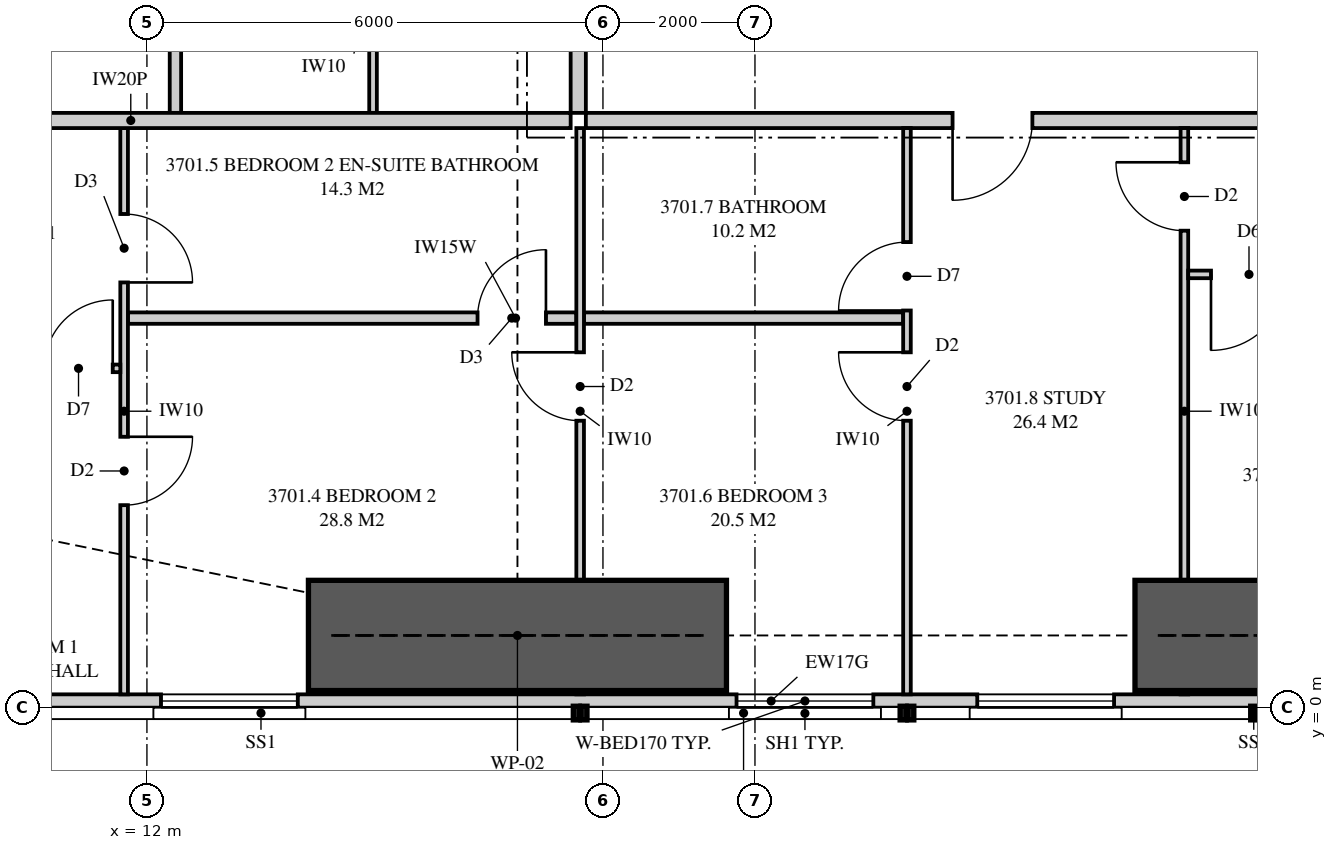
"""IFC4 building model, lengths in metres.
Left out: names, types, materials, properties, quantities, classifications, styles, units other than length and angle.
Written with IfcOpenShell. Run it as: python <this file> out.ifc"""

import sys

from ifc_helpers import new_model, si_unit, direction, frame, frame_2d, origin, place, context, subcontext, project, spatial, polyline, rectangle, outline, extrude, element, fill, save


model = new_model("IFC4")
c1 = context("Model", 3, precision=1e-05, world=origin(), true_north=direction((0.0, 1.0)))
c2 = subcontext(c1, "Body", "Model", "MODEL_VIEW")
j1 = project(units=[si_unit("LENGTHUNIT", "METRE"), si_unit("PLANEANGLEUNIT", "RADIAN")], contexts=[c1])
p1 = place(None, origin())
s1 = spatial("IfcSite", under=j1, at=p1, CompositionType="ELEMENT")
p2 = place(p1, origin())
s2 = spatial("IfcBuilding", under=s1, at=p2, CompositionType="ELEMENT")
p3 = place(p2, frame((0.0, 0.0, 135.0)))
s3 = spatial("IfcBuildingStorey", under=s2, at=p3, CompositionType="ELEMENT", Elevation=135.0)
p4 = place(p3, frame((9.051, 0.087, 0.0), z_axis=(0.0, 0.0, 1.0), x_axis=(1.0, 0.0, 0.0)))
e1 = element("IfcWall", 1, at=p4, inside=s3, PredefinedType="SOLIDWALL", context=c2, shape_type="SweptSolid", body=[
    extrude(outline(polyline([(0.0, 0.0), (22.324, 0.0), (22.324, 2.15), (7.824, 2.15), (7.824, 3.11), (7.666, 3.11), (7.666, 2.15), (7.62, 2.15), (7.62, 3.11), (0.0, 3.11), (0.0, 0.0)])), frame((0.0, 0.087, 0.0), z_axis=(0.0, -1.0, 0.0), x_axis=(1.0, 0.0, 0.0)), (0.0, 0.0, 1.0), 0.175),
])
p5 = place(p4, frame((3.134, 0.0, 0.4)))
e2 = element("IfcOpeningElement", 2, at=p5, cuts=e1, PredefinedType="OPENING", context=c2, shape_type="SweptSolid", body=[
    extrude(rectangle(XDim=1.8, YDim=1.7, at=frame_2d((0.9, 0.85))), frame((0.0, 0.097, 0.0), z_axis=(0.0, -1.0, 0.0), x_axis=(1.0, 0.0, 0.0)), (0.0, 0.0, 1.0), 0.195),
])
p6 = place(p4, frame((10.706, 0.0, 0.4)))
e3 = element("IfcOpeningElement", 3, at=p6, cuts=e1, PredefinedType="OPENING", context=c2, shape_type="SweptSolid", body=[
    extrude(rectangle(XDim=1.8, YDim=1.7, at=frame_2d((0.9, 0.85))), frame((0.0, 0.097, 0.0), z_axis=(0.0, -1.0, 0.0), x_axis=(1.0, 0.0, 0.0)), (0.0, 0.0, 1.0), 0.195),
])
p7 = place(p4, frame((13.874, 0.0, 0.4)))
e4 = element("IfcOpeningElement", 4, at=p7, cuts=e1, PredefinedType="OPENING", context=c2, shape_type="SweptSolid", body=[
    extrude(rectangle(XDim=1.8, YDim=1.7, at=frame_2d((0.9, 0.85))), frame((0.0, 0.097, 0.0), z_axis=(0.0, -1.0, 0.0), x_axis=(1.0, 0.0, 0.0)), (0.0, 0.0, 1.0), 0.195),
])
p8 = place(p3, frame((17.775, 7.725, 0.0), z_axis=(0.0, 0.0, 1.0), x_axis=(1.0, 0.0, 0.0)))
e5 = element("IfcWall", 5, at=p8, inside=s3, PredefinedType="PARTITIONING", context=c2, shape_type="SweptSolid", body=[
    extrude(outline(polyline([(0.0, 0.0), (22.325, 0.0), (22.325, 3.11), (21.187, 3.11), (21.187, 2.541), (20.513, 2.541), (20.513, 3.11), (10.312, 3.11), (10.312, 2.541), (9.638, 2.541), (9.638, 3.11), (0.0, 3.11), (0.0, 0.0)])), frame((0.0, 0.1, 0.0), z_axis=(0.0, -1.0, 0.0), x_axis=(1.0, 0.0, 0.0)), (0.0, 0.0, 1.0), 0.2),
])
p9 = place(p8, frame((4.825, 0.0, 0.0)))
e6 = element("IfcOpeningElement", 6, at=p9, cuts=e5, PredefinedType="OPENING", context=c2, shape_type="SweptSolid", body=[
    extrude(rectangle(XDim=1.05, YDim=2.2, at=frame_2d((0.525, 1.1))), frame((0.0, 0.11, 0.0), z_axis=(0.0, -1.0, 0.0), x_axis=(1.0, 0.0, 0.0)), (0.0, 0.0, 1.0), 0.22),
])
p10 = place(p3, frame((11.7, 0.175, 0.0), z_axis=(0.0, 0.0, 1.0), x_axis=(0.0, 1.0, 0.0)))
e7 = element("IfcWall", 7, at=p10, inside=s3, PredefinedType="PARTITIONING", context=c2, shape_type="SweptSolid", body=[
    extrude(outline(polyline([(0.0, 0.0), (7.45, 0.0), (7.45, 3.11), (2.708, 3.11), (2.708, 2.15), (0.953, 2.15), (0.953, 3.11), (0.0, 3.11), (0.0, 0.0)])), frame((0.0, 0.05, 0.0), z_axis=(0.0, -1.0, 0.0), x_axis=(1.0, 0.0, 0.0)), (0.0, 0.0, 1.0), 0.1),
])
p11 = place(p10, frame((2.489, 0.0, 0.0)))
e8 = element("IfcOpeningElement", 8, at=p11, cuts=e7, PredefinedType="OPENING", context=c2, shape_type="SweptSolid", body=[
    extrude(rectangle(XDim=0.9, YDim=2.1, at=frame_2d((0.45, 1.05))), frame((0.0, 0.06, 0.0), z_axis=(0.0, -1.0, 0.0), x_axis=(1.0, 0.0, 0.0)), (0.0, 0.0, 1.0), 0.12),
])
p12 = place(p10, frame((5.419, 0.0, 0.0)))
e9 = element("IfcOpeningElement", 9, at=p12, cuts=e7, PredefinedType="OPENING", context=c2, shape_type="SweptSolid", body=[
    extrude(rectangle(XDim=0.9, YDim=2.1, at=frame_2d((0.45, 1.05))), frame((0.0, 0.06, 0.0), z_axis=(0.0, -1.0, 0.0), x_axis=(1.0, 0.0, 0.0)), (0.0, 0.0, 1.0), 0.12),
])
p13 = place(p3, frame((17.7, 0.175, 0.0), z_axis=(0.0, 0.0, 1.0), x_axis=(0.0, 1.0, 0.0)))
e10 = element("IfcWall", 10, at=p13, inside=s3, PredefinedType="PARTITIONING", context=c2, shape_type="SweptSolid", body=[
    extrude(outline(polyline([(1.635, 2.15), (0.0, 2.15), (0.0, 0.0), (7.45, 0.0), (7.45, 3.11), (1.635, 3.11), (1.635, 2.15)]), holes=[polyline([(1.021, 0.116), (0.529, 0.116), (0.529, 0.906), (1.021, 0.906), (1.021, 0.116)]), polyline([(1.021, 1.244), (0.529, 1.244), (0.529, 2.034), (1.021, 2.034), (1.021, 1.244)])]), frame((0.0, 0.05, 0.0), z_axis=(0.0, -1.0, 0.0), x_axis=(1.0, 0.0, 0.0)), (0.0, 0.0, 1.0), 0.1),
])
p14 = place(p13, frame((3.6, 0.0, 0.0)))
e11 = element("IfcOpeningElement", 11, at=p14, cuts=e10, PredefinedType="OPENING", context=c2, shape_type="SweptSolid", body=[
    extrude(rectangle(XDim=0.9, YDim=2.1, at=frame_2d((0.45, 1.05))), frame((0.0, 0.06, 0.0), z_axis=(0.0, -1.0, 0.0), x_axis=(1.0, 0.0, 0.0)), (0.0, 0.0, 1.0), 0.12),
])
p15 = place(p3, frame((22.0, 0.175, 0.0), z_axis=(0.0, 0.0, 1.0), x_axis=(0.0, 1.0, 0.0)))
e12 = element("IfcWall", 12, at=p15, inside=s3, PredefinedType="PARTITIONING", context=c2, shape_type="SweptSolid", body=[
    extrude(outline(polyline([(0.0, 0.0), (7.45, 0.0), (7.45, 3.11), (1.635, 3.11), (1.635, 2.15), (0.0, 2.15), (0.0, 3.11), (0.0, 0.0)])), frame((0.0, 0.05, 0.0), z_axis=(0.0, -1.0, 0.0), x_axis=(1.0, 0.0, 0.0)), (0.0, 0.0, 1.0), 0.1),
])
p16 = place(p15, frame((3.6, 0.0, 0.0)))
e13 = element("IfcOpeningElement", 13, at=p16, cuts=e12, PredefinedType="OPENING", context=c2, shape_type="SweptSolid", body=[
    extrude(rectangle(XDim=0.9, YDim=2.1, at=frame_2d((0.45, 1.05))), frame((0.0, 0.06, 0.0), z_axis=(0.0, -1.0, 0.0), x_axis=(1.0, 0.0, 0.0)), (0.0, 0.0, 1.0), 0.12),
])
p17 = place(p15, frame((5.05, 0.0, 0.0)))
e14 = element("IfcOpeningElement", 14, at=p17, cuts=e12, PredefinedType="OPENING", context=c2, shape_type="SweptSolid", body=[
    extrude(rectangle(XDim=0.9, YDim=2.1, at=frame_2d((0.45, 1.05))), frame((0.0, 0.06, 0.0), z_axis=(0.0, -1.0, 0.0), x_axis=(1.0, 0.0, 0.0)), (0.0, 0.0, 1.0), 0.12),
])
p18 = place(p3, frame((6.0, 4.464, 0.0), z_axis=(0.0, 0.0, 1.0), x_axis=(1.0, 0.0, 0.0)))
e15 = element("IfcWall", 15, at=p18, inside=s3, PredefinedType="PARTITIONING", context=c2, shape_type="SweptSolid", body=[
    extrude(outline(polyline([(0.0, 0.0), (5.65, 0.0), (5.65, 3.11), (5.46, 3.11), (5.46, 2.51), (3.206, 2.51), (3.206, 2.15), (1.463, 2.15), (1.463, 3.11), (0.0, 3.11), (0.0, 0.0)])), frame((0.0, 0.05, 0.0), z_axis=(0.0, -1.0, 0.0), x_axis=(1.0, 0.0, 0.0)), (0.0, 0.0, 1.0), 0.1),
])
p19 = place(p18, frame((4.65, 0.0, 0.0)))
e16 = element("IfcOpeningElement", 16, at=p19, cuts=e15, PredefinedType="OPENING", context=c2, shape_type="SweptSolid", body=[
    extrude(rectangle(XDim=0.9, YDim=2.1, at=frame_2d((0.45, 1.05))), frame((0.0, 0.06, 0.0), z_axis=(0.0, -1.0, 0.0), x_axis=(1.0, 0.0, 0.0)), (0.0, 0.0, 1.0), 0.12),
])
p20 = place(p3, frame((11.75, 5.125, 0.0), z_axis=(0.0, 0.0, 1.0), x_axis=(1.0, 0.0, 0.0)))
e17 = element("IfcWall", 17, at=p20, inside=s3, PredefinedType="PLUMBINGWALL", context=c2, shape_type="SweptSolid", body=[
    extrude(outline(polyline([(0.0, 0.0), (5.9, 0.0), (5.9, 3.11), (5.438, 3.11), (5.438, 2.541), (4.812, 2.541), (4.812, 3.11), (0.0, 3.11), (0.0, 0.0)])), frame((0.0, 0.075, 0.0), z_axis=(0.0, -1.0, 0.0), x_axis=(1.0, 0.0, 0.0)), (0.0, 0.0, 1.0), 0.15),
])
p21 = place(p20, frame((4.6, 0.0, 0.0)))
e18 = element("IfcOpeningElement", 18, at=p21, cuts=e17, PredefinedType="OPENING", context=c2, shape_type="SweptSolid", body=[
    extrude(rectangle(XDim=0.9, YDim=2.1, at=frame_2d((0.45, 1.05))), frame((0.0, 0.085, 0.0), z_axis=(0.0, -1.0, 0.0), x_axis=(1.0, 0.0, 0.0)), (0.0, 0.0, 1.0), 0.17),
])
p22 = place(p3, frame((17.75, 5.125, 0.0), z_axis=(0.0, 0.0, 1.0), x_axis=(1.0, 0.0, 0.0)))
e19 = element("IfcWall", 19, at=p22, inside=s3, PredefinedType="PLUMBINGWALL", context=c2, shape_type="SweptSolid", body=[
    extrude(rectangle(XDim=4.2, YDim=0.15, at=frame_2d((2.1, 0.0))), origin(), (0.0, 0.0, 1.0), 3.11),
])
p23 = place(p3, frame((25.65, 0.175, 0.0), z_axis=(0.0, 0.0, 1.0), x_axis=(0.0, 1.0, 0.0)))
e20 = element("IfcWall", 20, at=p23, inside=s3, PredefinedType="PARTITIONING", context=c2, shape_type="SweptSolid", body=[
    extrude(outline(polyline([(0.529, 2.15), (0.0, 2.15), (0.0, 0.0), (0.529, 0.0), (0.529, 0.034), (1.021, 0.034), (1.021, 0.0), (7.45, 0.0), (7.45, 3.11), (1.635, 3.11), (1.635, 2.15), (1.021, 2.15), (1.021, 2.116), (0.529, 2.116), (0.529, 2.15)])), frame((0.0, 0.05, 0.0), z_axis=(0.0, -1.0, 0.0), x_axis=(1.0, 0.0, 0.0)), (0.0, 0.0, 1.0), 0.1),
])
p24 = place(p23, frame((6.1, 0.0, 0.0)))
e21 = element("IfcOpeningElement", 21, at=p24, cuts=e20, PredefinedType="OPENING", context=c2, shape_type="SweptSolid", body=[
    extrude(rectangle(XDim=0.9, YDim=2.1, at=frame_2d((0.45, 1.05))), frame((0.0, 0.06, 0.0), z_axis=(0.0, -1.0, 0.0), x_axis=(1.0, 0.0, 0.0)), (0.0, 0.0, 1.0), 0.12),
])
p25 = place(p3, frame((25.7, 5.7, 0.0), z_axis=(0.0, 0.0, 1.0), x_axis=(1.0, 0.0, 0.0)))
e22 = element("IfcWall", 22, at=p25, inside=s3, PredefinedType="PARTITIONING", context=c2, shape_type="SweptSolid", body=[
    extrude(outline(polyline([(0.0, 0.0), (10.75, 0.0), (10.75, 3.11), (2.337, 3.11), (2.337, 2.541), (1.763, 2.541), (1.763, 3.11), (0.0, 3.11), (0.0, 0.0)])), frame((0.0, 0.05, 0.0), z_axis=(0.0, -1.0, 0.0), x_axis=(1.0, 0.0, 0.0)), (0.0, 0.0, 1.0), 0.1),
])
p26 = place(p25, frame((0.3, 0.0, 0.0)))
e23 = element("IfcOpeningElement", 23, at=p26, cuts=e22, PredefinedType="OPENING", context=c2, shape_type="SweptSolid", body=[
    extrude(rectangle(XDim=1.0, YDim=2.1, at=frame_2d((0.5, 1.05))), frame((0.0, 0.06, 0.0), z_axis=(0.0, -1.0, 0.0), x_axis=(1.0, 0.0, 0.0)), (0.0, 0.0, 1.0), 0.12),
])
p27 = place(p3, frame((6.0, 7.725, 0.0), z_axis=(0.0, 0.0, 1.0), x_axis=(1.0, 0.0, 0.0)))
e24 = element("IfcWall", 24, at=p27, inside=s3, PredefinedType="PARTITIONING", context=c2, shape_type="SweptSolid", body=[
    extrude(outline(polyline([(0.0, 0.0), (11.575, 0.0), (11.575, 3.11), (11.212, 3.11), (11.212, 2.541), (10.538, 2.541), (10.538, 3.11), (5.51, 3.11), (5.51, 2.51), (2.969, 2.51), (2.969, 2.541), (2.727, 2.541), (2.727, 2.15), (0.884, 2.15), (0.884, 3.11), (0.0, 3.11), (0.0, 0.0)])), frame((0.0, 0.1, 0.0), z_axis=(0.0, -1.0, 0.0), x_axis=(1.0, 0.0, 0.0)), (0.0, 0.0, 1.0), 0.2),
])
p28 = place(p3, frame((17.675, 7.825, 0.0), z_axis=(0.0, 0.0, 1.0), x_axis=(0.0, 1.0, 0.0)))
e25 = element("IfcWall", 25, at=p28, inside=s3, PredefinedType="PARTITIONING", context=c2, shape_type="SweptSolid", body=[
    extrude(outline(polyline([(0.0, 0.0), (15.425, 0.0), (15.425, 3.11), (3.087, 3.11), (3.087, 2.541), (2.413, 2.541), (2.413, 3.11), (0.0, 3.11), (0.0, 0.0)])), frame((0.0, 0.1, 0.0), z_axis=(0.0, -1.0, 0.0), x_axis=(1.0, 0.0, 0.0)), (0.0, 0.0, 1.0), 0.2),
])
p29 = place(p28, frame((7.212, 0.0, 0.0)))
e26 = element("IfcOpeningElement", 26, at=p29, cuts=e25, PredefinedType="OPENING", context=c2, shape_type="SweptSolid", body=[
    extrude(rectangle(XDim=1.05, YDim=2.2, at=frame_2d((0.525, 1.1))), frame((0.0, 0.11, 0.0), z_axis=(0.0, -1.0, 0.0), x_axis=(1.0, 0.0, 0.0)), (0.0, 0.0, 1.0), 0.22),
])
p30 = place(p3, frame((12.375, 7.825, 0.0), z_axis=(0.0, 0.0, 1.0), x_axis=(0.0, 1.0, 0.0)))
e27 = element("IfcWall", 27, at=p30, inside=s3, PredefinedType="PLUMBINGWALL", context=c2, shape_type="SweptSolid", body=[
    extrude(outline(polyline([(0.0, 0.0), (3.45, 0.0), (3.45, 3.11), (3.062, 3.11), (3.062, 2.541), (2.438, 2.541), (2.438, 3.11), (0.0, 3.11), (0.0, 0.0)])), frame((0.0, 0.075, 0.0), z_axis=(0.0, -1.0, 0.0), x_axis=(1.0, 0.0, 0.0)), (0.0, 0.0, 1.0), 0.15),
])
p31 = place(p3, frame((14.975, 7.825, 0.0), z_axis=(0.0, 0.0, 1.0), x_axis=(0.0, 1.0, 0.0)))
e28 = element("IfcWall", 28, at=p31, inside=s3, PredefinedType="PARTITIONING", context=c2, shape_type="SweptSolid", body=[
    extrude(outline(polyline([(0.0, 0.0), (3.45, 0.0), (3.45, 3.11), (3.037, 3.11), (3.037, 2.541), (2.463, 2.541), (2.463, 3.11), (0.0, 3.11), (0.0, 0.0)])), frame((0.0, 0.05, 0.0), z_axis=(0.0, -1.0, 0.0), x_axis=(1.0, 0.0, 0.0)), (0.0, 0.0, 1.0), 0.1),
])
for number, where, z_axis, x_axis in (
    (29, (14.125, 0.95, 0.0), (0.0, 0.0, 1.0), (1.0, 0.0, 0.0)),
    (30, (25.0, 0.95, 0.0), (0.0, 0.0, 1.0), (1.0, 0.0, 0.0)),
):
    element("IfcWall", number, at=place(p3, frame(where, z_axis=z_axis, x_axis=x_axis)), inside=s3, PredefinedType="SHEAR", context=c2, shape_type="SweptSolid", body=[
        extrude(rectangle(XDim=5.5, YDim=1.45, at=frame_2d((2.75, 0.0))), origin(), (0.0, 0.0, 1.0), 3.35),
    ])
p32 = place(p5, origin())
e31 = element("IfcWindow", 31, at=p32, inside=s3, PartitioningType="SINGLE_PANEL", PredefinedType="WINDOW", context=c2, shape_type="SweptSolid", body=[
    extrude(rectangle(XDim=1.8, YDim=1.7, at=frame_2d((0.9, 0.85))), frame((0.0, 0.03, 0.0), z_axis=(0.0, -1.0, 0.0), x_axis=(1.0, 0.0, 0.0)), (0.0, 0.0, 1.0), 0.06),
])
fill(e2, e31)
p33 = place(p6, origin())
e32 = element("IfcWindow", 32, at=p33, inside=s3, PartitioningType="SINGLE_PANEL", PredefinedType="WINDOW", context=c2, shape_type="SweptSolid", body=[
    extrude(rectangle(XDim=1.8, YDim=1.7, at=frame_2d((0.9, 0.85))), frame((0.0, 0.03, 0.0), z_axis=(0.0, -1.0, 0.0), x_axis=(1.0, 0.0, 0.0)), (0.0, 0.0, 1.0), 0.06),
])
fill(e3, e32)
p34 = place(p7, origin())
e33 = element("IfcWindow", 33, at=p34, inside=s3, PartitioningType="SINGLE_PANEL", PredefinedType="WINDOW", context=c2, shape_type="SweptSolid", body=[
    extrude(rectangle(XDim=1.8, YDim=1.7, at=frame_2d((0.9, 0.85))), frame((0.0, 0.03, 0.0), z_axis=(0.0, -1.0, 0.0), x_axis=(1.0, 0.0, 0.0)), (0.0, 0.0, 1.0), 0.06),
])
fill(e4, e33)
p35 = place(p9, frame((1.05, 0.0, 0.0), z_axis=(0.0, 0.0, 1.0), x_axis=(-1.0, 0.0, 0.0)))
e34 = element("IfcDoor", 34, at=p35, inside=s3, OperationType="SINGLE_SWING_RIGHT", PredefinedType="DOOR", context=c2, shape_type="SweptSolid", body=[
    extrude(rectangle(XDim=1.05, YDim=2.2, at=frame_2d((0.525, 1.1))), frame((0.0, 0.025, 0.0), z_axis=(0.0, -1.0, 0.0), x_axis=(1.0, 0.0, 0.0)), (0.0, 0.0, 1.0), 0.05),
])
fill(e6, e34)
p36 = place(p19, origin())
e35 = element("IfcDoor", 35, at=p36, inside=s3, OperationType="SINGLE_SWING_RIGHT", PredefinedType="DOOR", context=c2, shape_type="SweptSolid", body=[
    extrude(rectangle(XDim=0.9, YDim=2.1, at=frame_2d((0.45, 1.05))), frame((0.0, 0.025, 0.0), z_axis=(0.0, -1.0, 0.0), x_axis=(1.0, 0.0, 0.0)), (0.0, 0.0, 1.0), 0.05),
])
fill(e16, e35)
p37 = place(p11, frame((0.9, 0.0, 0.0), z_axis=(0.0, 0.0, 1.0), x_axis=(-1.0, 0.0, 0.0)))
e36 = element("IfcDoor", 36, at=p37, inside=s3, OperationType="SINGLE_SWING_LEFT", PredefinedType="DOOR", context=c2, shape_type="SweptSolid", body=[
    extrude(rectangle(XDim=0.9, YDim=2.1, at=frame_2d((0.45, 1.05))), frame((0.0, 0.025, 0.0), z_axis=(0.0, -1.0, 0.0), x_axis=(1.0, 0.0, 0.0)), (0.0, 0.0, 1.0), 0.05),
])
fill(e8, e36)
p38 = place(p14, origin())
e37 = element("IfcDoor", 37, at=p38, inside=s3, OperationType="SINGLE_SWING_RIGHT", PredefinedType="DOOR", context=c2, shape_type="SweptSolid", body=[
    extrude(rectangle(XDim=0.9, YDim=2.1, at=frame_2d((0.45, 1.05))), frame((0.0, 0.025, 0.0), z_axis=(0.0, -1.0, 0.0), x_axis=(1.0, 0.0, 0.0)), (0.0, 0.0, 1.0), 0.05),
])
fill(e11, e37)
p39 = place(p21, origin())
e38 = element("IfcDoor", 38, at=p39, inside=s3, OperationType="SINGLE_SWING_RIGHT", PredefinedType="DOOR", context=c2, shape_type="SweptSolid", body=[
    extrude(rectangle(XDim=0.9, YDim=2.1, at=frame_2d((0.45, 1.05))), frame((0.0, 0.025, 0.0), z_axis=(0.0, -1.0, 0.0), x_axis=(1.0, 0.0, 0.0)), (0.0, 0.0, 1.0), 0.05),
])
fill(e18, e38)
p40 = place(p16, origin())
e39 = element("IfcDoor", 39, at=p40, inside=s3, OperationType="SINGLE_SWING_RIGHT", PredefinedType="DOOR", context=c2, shape_type="SweptSolid", body=[
    extrude(rectangle(XDim=0.9, YDim=2.1, at=frame_2d((0.45, 1.05))), frame((0.0, 0.025, 0.0), z_axis=(0.0, -1.0, 0.0), x_axis=(1.0, 0.0, 0.0)), (0.0, 0.0, 1.0), 0.05),
])
fill(e13, e39)
p41 = place(p17, origin())
e40 = element("IfcDoor", 40, at=p41, inside=s3, OperationType="SINGLE_SWING_LEFT", PredefinedType="DOOR", context=c2, shape_type="SweptSolid", body=[
    extrude(rectangle(XDim=0.9, YDim=2.1, at=frame_2d((0.45, 1.05))), frame((0.0, 0.025, 0.0), z_axis=(0.0, -1.0, 0.0), x_axis=(1.0, 0.0, 0.0)), (0.0, 0.0, 1.0), 0.05),
])
fill(e14, e40)
p42 = place(p12, frame((0.9, 0.0, 0.0), z_axis=(0.0, 0.0, 1.0), x_axis=(-1.0, 0.0, 0.0)))
e41 = element("IfcDoor", 41, at=p42, inside=s3, OperationType="SINGLE_SWING_RIGHT", PredefinedType="DOOR", context=c2, shape_type="SweptSolid", body=[
    extrude(rectangle(XDim=0.9, YDim=2.1, at=frame_2d((0.45, 1.05))), frame((0.0, 0.025, 0.0), z_axis=(0.0, -1.0, 0.0), x_axis=(1.0, 0.0, 0.0)), (0.0, 0.0, 1.0), 0.05),
])
fill(e9, e41)
p43 = place(p24, origin())
e42 = element("IfcDoor", 42, at=p43, inside=s3, OperationType="SINGLE_SWING_RIGHT", PredefinedType="DOOR", context=c2, shape_type="SweptSolid", body=[
    extrude(rectangle(XDim=0.9, YDim=2.1, at=frame_2d((0.45, 1.05))), frame((0.0, 0.025, 0.0), z_axis=(0.0, -1.0, 0.0), x_axis=(1.0, 0.0, 0.0)), (0.0, 0.0, 1.0), 0.05),
])
fill(e21, e42)
p44 = place(p26, frame((1.0, 0.0, 0.0), z_axis=(0.0, 0.0, 1.0), x_axis=(-1.0, 0.0, 0.0)))
e43 = element("IfcDoor", 43, at=p44, inside=s3, OperationType="SINGLE_SWING_RIGHT", PredefinedType="DOOR", context=c2, shape_type="SweptSolid", body=[
    extrude(rectangle(XDim=1.0, YDim=2.1, at=frame_2d((0.5, 1.05))), frame((0.0, 0.025, 0.0), z_axis=(0.0, -1.0, 0.0), x_axis=(1.0, 0.0, 0.0)), (0.0, 0.0, 1.0), 0.05),
])
fill(e23, e43)
save(model, sys.argv[1])
